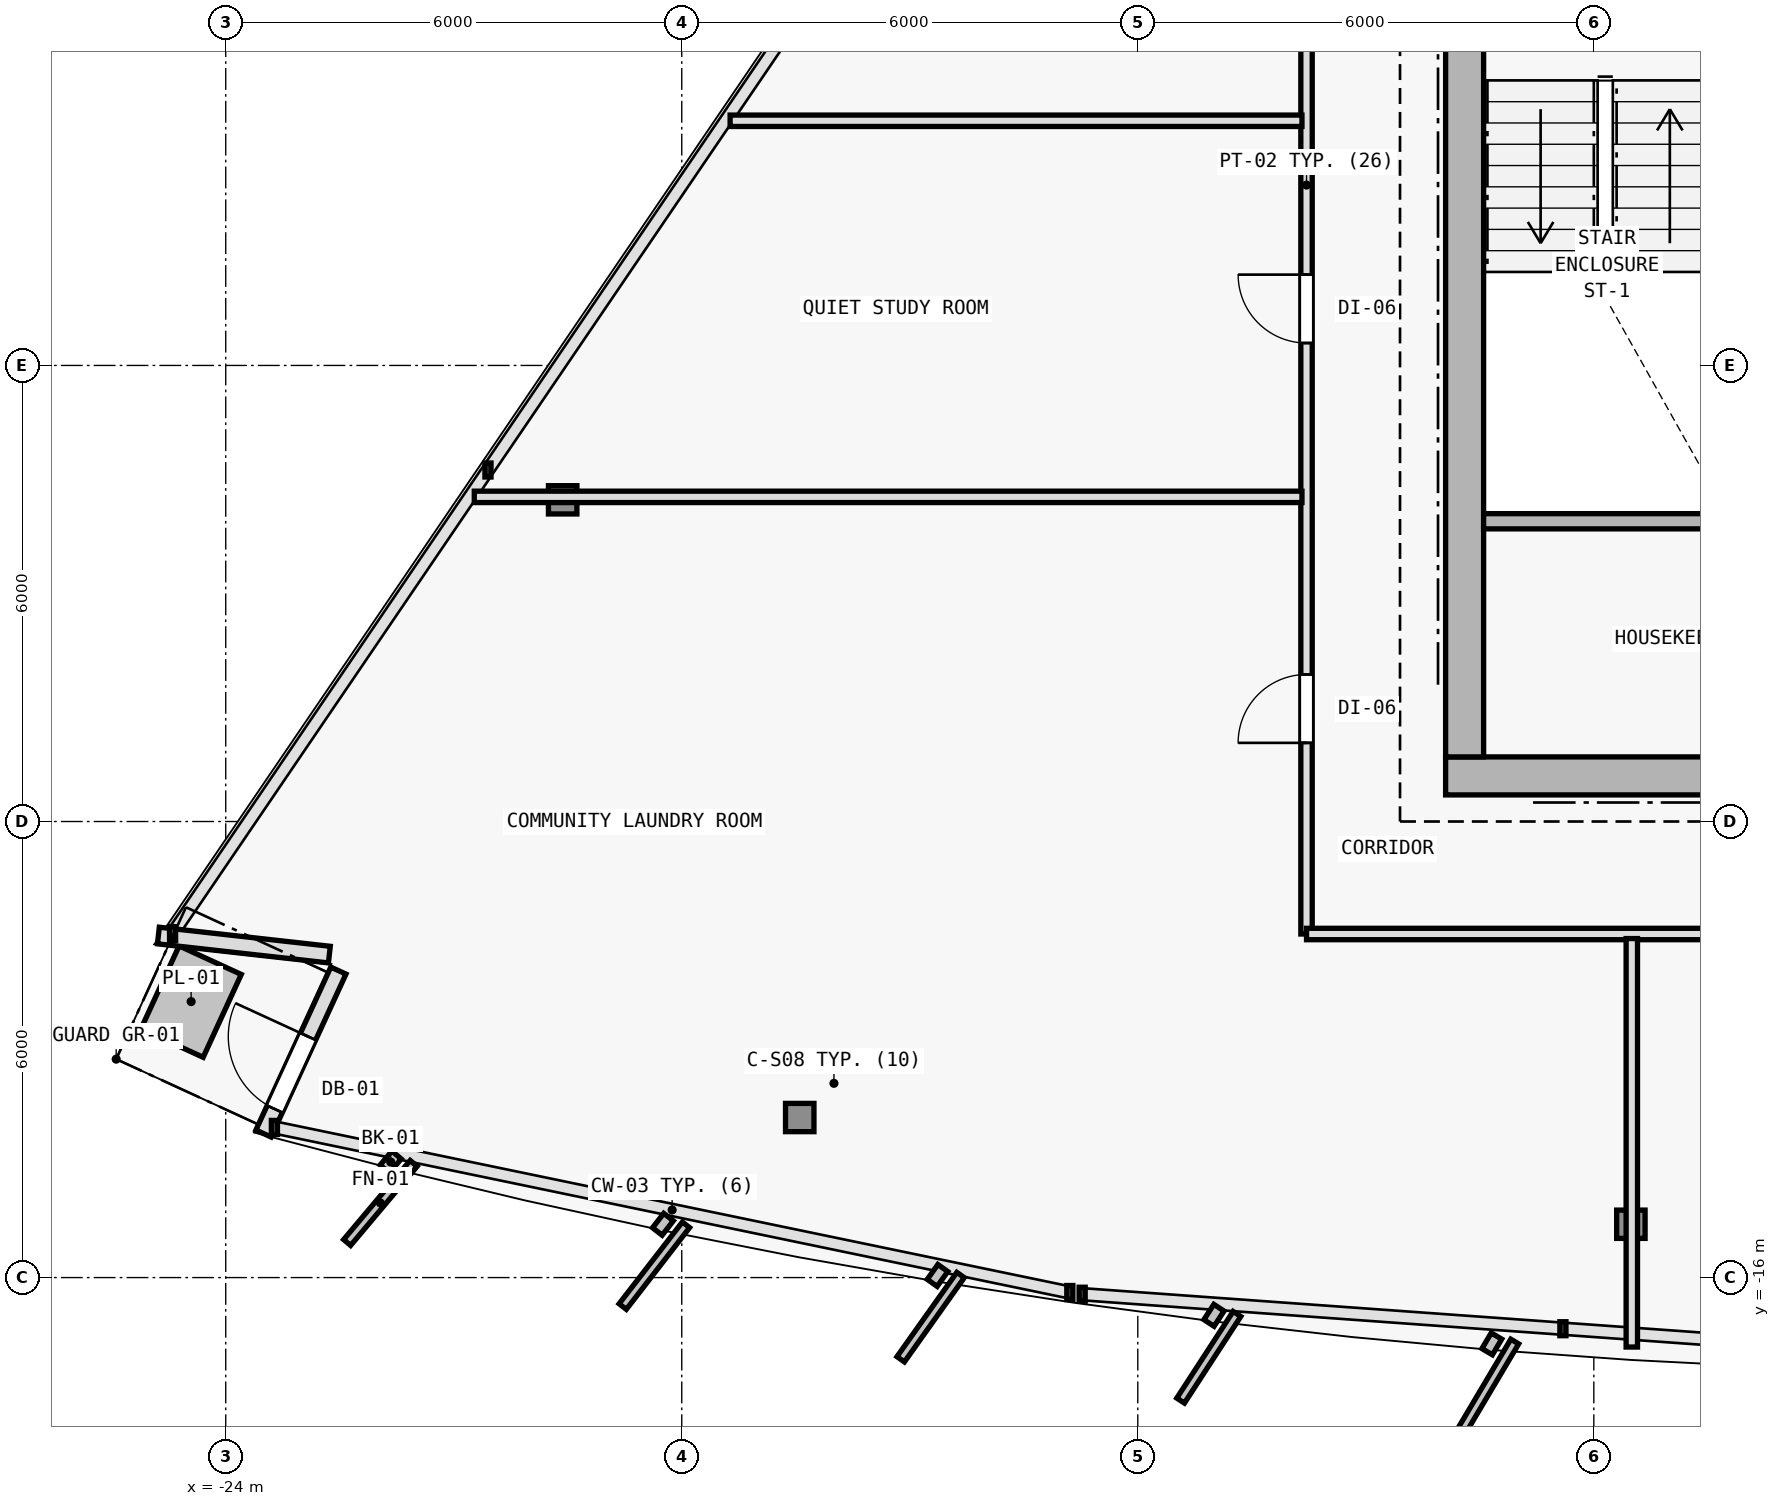
"""IFC4 building model, lengths in metres.
Left out: names, types, materials, properties, quantities, classifications, styles, units other than length and angle.
Written with IfcOpenShell. Run it as: python <this file> out.ifc"""

import sys

from ifc_helpers import new_model, si_unit, direction, frame, frame_2d, origin, origin_2d, place, context, subcontext, project, spatial, rectangle, i_section, extrude, element, fill, save


model = new_model("IFC4")
c1 = context("Model", 3, precision=1e-05, world=origin(), true_north=direction((0.0, 1.0)))
c2 = subcontext(c1, "Body", "Model", "MODEL_VIEW")
j1 = project(units=[si_unit("LENGTHUNIT", "METRE"), si_unit("PLANEANGLEUNIT", "RADIAN")], contexts=[c1])
p1 = place(None, origin())
s1 = spatial("IfcSite", under=j1, at=p1, CompositionType="ELEMENT")
p2 = place(p1, origin())
s2 = spatial("IfcBuilding", under=s1, at=p2, CompositionType="ELEMENT")
p3 = place(p2, frame((0.0, 0.0, 223.5)))
s3 = spatial("IfcBuildingStorey", under=s2, at=p3, CompositionType="ELEMENT", Elevation=223.5)
p4 = place(p3, frame((-7.7, -9.4, 0.0), z_axis=(0.0, 0.0, 1.0), x_axis=(1.0, 0.0, 0.0)))
e1 = element("IfcColumn", 1, at=p4, inside=s3, PredefinedType="COLUMN", context=c2, shape_type="SweptSolid", body=[
    extrude(i_section(OverallWidth=0.398, OverallDepth=0.387, WebThickness=0.013, FlangeThickness=0.022, FilletRadius=0.015, at=origin_2d()), origin(), (0.0, 0.0, 1.0), 3.6),
])
p5 = place(p3, frame((-16.448, -13.894, 0.006), z_axis=(0.020664285442, 0.033443514597, 0.999226960524), x_axis=(-0.850707037426, 0.525640120686, 0.0)))
e2 = element("IfcColumn", 2, at=p5, inside=s3, PredefinedType="COLUMN", context=c2, shape_type="SweptSolid", body=[
    extrude(i_section(OverallWidth=0.374, OverallDepth=0.372, WebThickness=0.012, FlangeThickness=0.02, FilletRadius=0.015, at=origin_2d()), origin(), (0.0, 0.0, 1.0), 3.592),
])
p6 = place(p3, frame((-5.513, -15.298, 0.006), z_axis=(0.006934304776, 0.03521539092, 0.999355688261), x_axis=(-0.981159154887, 0.193201223549, 0.0)))
e3 = element("IfcColumn", 3, at=p6, inside=s3, PredefinedType="COLUMN", context=c2, shape_type="SweptSolid", body=[
    extrude(i_section(OverallWidth=0.374, OverallDepth=0.372, WebThickness=0.012, FlangeThickness=0.02, FilletRadius=0.015, at=origin_2d()), origin(), (0.0, 0.0, 1.0), 3.591),
])
p7 = place(p3, frame((-19.567, -5.768, 0.006), z_axis=(0.025224163578, 0.021620711639, 0.999447990843), x_axis=(-0.650791373456, 0.759256602365, 0.0)))
e4 = element("IfcColumn", 4, at=p7, inside=s3, PredefinedType="COLUMN", context=c2, shape_type="SweptSolid", body=[
    extrude(i_section(OverallWidth=0.374, OverallDepth=0.372, WebThickness=0.012, FlangeThickness=0.02, FilletRadius=0.015, at=origin_2d()), origin(), (0.0, 0.0, 1.0), 3.591),
])
p8 = place(p3, frame((-22.637, -11.751, 0.0), z_axis=(0.0, 0.0, 1.0), x_axis=(-0.993821756753, 0.110987908368, 0.0)))
e5 = element("IfcWall", 5, at=p8, inside=s3, PredefinedType="SOLIDWALL", context=c2, shape_type="SweptSolid", body=[
    extrude(rectangle(XDim=2.263, YDim=0.22, at=frame_2d((1.132, 0.0))), origin(), (0.0, 0.0, 1.0), 3.35),
])
p9 = place(p3, frame((-23.503, -14.105, 0.0), z_axis=(0.0, 0.0, 1.0), x_axis=(0.417541737863, 0.908657744777, 0.0)))
e6 = element("IfcWall", 6, at=p9, inside=s3, PredefinedType="SOLIDWALL", context=c2, shape_type="SweptSolid", body=[
    extrude(rectangle(XDim=2.359, YDim=0.22, at=frame_2d((1.18, 0.0))), origin(), (0.0, 0.0, 1.0), 3.35),
])
p10 = place(p9, frame((0.354, 0.0, 0.0)))
e7 = element("IfcOpeningElement", 7, at=p10, cuts=e6, PredefinedType="OPENING", context=c2, shape_type="SweptSolid", body=[
    extrude(rectangle(XDim=1.05, YDim=2.15, at=frame_2d((0.525, 1.075))), frame((0.0, 0.12, 0.0), z_axis=(0.0, -1.0, 0.0), x_axis=(1.0, 0.0, 0.0)), (0.0, 0.0, 1.0), 0.24),
])
p11 = place(p3, frame((-7.95, -9.4, 0.0), z_axis=(0.0, 0.0, 1.0), x_axis=(1.0, 0.0, 0.0)))
e8 = element("IfcWall", 8, at=p11, inside=s3, PredefinedType="SHEAR", context=c2, shape_type="SweptSolid", body=[
    extrude(rectangle(XDim=15.9, YDim=0.5, at=frame_2d((7.95, 0.0))), origin(), (0.0, 0.0, 1.0), 3.35),
])
p12 = place(p11, frame((9.6, 0.0, 0.0)))
e9 = element("IfcOpeningElement", 9, at=p12, cuts=e8, PredefinedType="OPENING", context=c2, shape_type="SweptSolid", body=[
    extrude(rectangle(XDim=1.5, YDim=2.2, at=frame_2d((0.75, 1.1))), frame((0.0, 0.26, 0.0), z_axis=(0.0, -1.0, 0.0), x_axis=(1.0, 0.0, 0.0)), (0.0, 0.0, 1.0), 0.52),
])
p13 = place(p3, frame((-7.7, -9.15, 0.0), z_axis=(0.0, 0.0, 1.0), x_axis=(0.0, 1.0, 0.0)))
e10 = element("IfcWall", 10, at=p13, inside=s3, PredefinedType="SHEAR", context=c2, shape_type="SweptSolid", body=[
    extrude(rectangle(XDim=19.1, YDim=0.5, at=frame_2d((9.55, 0.0))), origin(), (0.0, 0.0, 1.0), 3.35),
])
p14 = place(p13, frame((12.7, 0.0, 0.0)))
e11 = element("IfcOpeningElement", 11, at=p14, cuts=e10, PredefinedType="OPENING", context=c2, shape_type="SweptSolid", body=[
    extrude(rectangle(XDim=1.1, YDim=2.15, at=frame_2d((0.55, 1.075))), frame((0.0, 0.26, 0.0), z_axis=(0.0, -1.0, 0.0), x_axis=(1.0, 0.0, 0.0)), (0.0, 0.0, 1.0), 0.52),
])
p15 = place(p3, frame((-7.45, -6.05, 0.0), z_axis=(0.0, 0.0, 1.0), x_axis=(1.0, 0.0, 0.0)))
e12 = element("IfcWall", 12, at=p15, inside=s3, PredefinedType="SOLIDWALL", context=c2, shape_type="SweptSolid", body=[
    extrude(rectangle(XDim=3.4, YDim=0.2, at=frame_2d((1.7, 0.0))), origin(), (0.0, 0.0, 1.0), 3.35),
])
p16 = place(p3, frame((-9.78, -11.48, 0.0), z_axis=(0.0, 0.0, 1.0), x_axis=(0.0, 1.0, 0.0)))
e13 = element("IfcWall", 13, at=p16, inside=s3, PredefinedType="PARTITIONING", context=c2, shape_type="SweptSolid", body=[
    extrude(rectangle(XDim=19.706, YDim=0.15, at=frame_2d((9.853, 0.0))), origin(), (0.0, 0.0, 1.0), 2.825),
])
p17 = place(p16, frame((7.775, 0.0, 0.0)))
e14 = element("IfcOpeningElement", 14, at=p17, cuts=e13, PredefinedType="OPENING", context=c2, shape_type="SweptSolid", body=[
    extrude(rectangle(XDim=0.9, YDim=2.1, at=frame_2d((0.45, 1.05))), frame((0.0, 0.085, 0.0), z_axis=(0.0, -1.0, 0.0), x_axis=(1.0, 0.0, 0.0)), (0.0, 0.0, 1.0), 0.17),
])
p18 = place(p16, frame((2.515, 0.0, 0.0)))
e15 = element("IfcOpeningElement", 15, at=p18, cuts=e13, PredefinedType="OPENING", context=c2, shape_type="SweptSolid", body=[
    extrude(rectangle(XDim=0.9, YDim=2.1, at=frame_2d((0.45, 1.05))), frame((0.0, 0.085, 0.0), z_axis=(0.0, -1.0, 0.0), x_axis=(1.0, 0.0, 0.0)), (0.0, 0.0, 1.0), 0.17),
])
p19 = place(p16, frame((12.635, 0.0, 0.0)))
e16 = element("IfcOpeningElement", 16, at=p19, cuts=e13, PredefinedType="OPENING", context=c2, shape_type="SweptSolid", body=[
    extrude(rectangle(XDim=0.9, YDim=2.1, at=frame_2d((0.45, 1.05))), frame((0.0, 0.085, 0.0), z_axis=(0.0, -1.0, 0.0), x_axis=(1.0, 0.0, 0.0)), (0.0, 0.0, 1.0), 0.17),
])
p20 = place(p3, frame((9.78, -11.48, 0.0), z_axis=(0.0, 0.0, 1.0), x_axis=(-1.0, 0.0, 0.0)))
e17 = element("IfcWall", 17, at=p20, inside=s3, PredefinedType="PARTITIONING", context=c2, shape_type="SweptSolid", body=[
    extrude(rectangle(XDim=19.56, YDim=0.15, at=frame_2d((9.78, 0.0))), origin(), (0.0, 0.0, 1.0), 3.005),
])
p21 = place(p20, frame((12.177, 0.0, 0.0)))
e18 = element("IfcOpeningElement", 18, at=p21, cuts=e17, PredefinedType="OPENING", context=c2, shape_type="SweptSolid", body=[
    extrude(rectangle(XDim=0.9, YDim=2.1, at=frame_2d((0.45, 1.05))), frame((0.0, 0.085, 0.0), z_axis=(0.0, -1.0, 0.0), x_axis=(1.0, 0.0, 0.0)), (0.0, 0.0, 1.0), 0.17),
])
p22 = place(p20, frame((6.677, 0.0, 0.0)))
e19 = element("IfcOpeningElement", 19, at=p22, cuts=e17, PredefinedType="OPENING", context=c2, shape_type="SweptSolid", body=[
    extrude(rectangle(XDim=0.9, YDim=2.1, at=frame_2d((0.45, 1.05))), frame((0.0, 0.085, 0.0), z_axis=(0.0, -1.0, 0.0), x_axis=(1.0, 0.0, 0.0)), (0.0, 0.0, 1.0), 0.17),
])
p23 = place(p3, frame((-5.5, -11.54, 0.0), z_axis=(0.0, 0.0, 1.0), x_axis=(0.0, -1.0, 0.0)))
e20 = element("IfcWall", 20, at=p23, inside=s3, PredefinedType="PARTITIONING", context=c2, shape_type="SweptSolid", body=[
    extrude(rectangle(XDim=5.374, YDim=0.15, at=frame_2d((2.687, 0.0))), origin(), (0.0, 0.0, 1.0), 2.775),
])
p24 = place(p3, frame((-9.84, -5.729, 0.0), z_axis=(0.0, 0.0, 1.0), x_axis=(-1.0, 0.0, 0.0)))
e21 = element("IfcWall", 21, at=p24, inside=s3, PredefinedType="PARTITIONING", context=c2, shape_type="SweptSolid", body=[
    extrude(rectangle(XDim=10.89, YDim=0.15, at=frame_2d((5.445, 0.0))), origin(), (0.0, 0.0, 1.0), 2.825),
])
p25 = place(p3, frame((-9.84, -0.781, 0.0), z_axis=(0.0, 0.0, 1.0), x_axis=(-1.0, 0.0, 0.0)))
e22 = element("IfcWall", 22, at=p25, inside=s3, PredefinedType="PARTITIONING", context=c2, shape_type="SweptSolid", body=[
    extrude(rectangle(XDim=7.524, YDim=0.15, at=frame_2d((3.762, 0.0))), origin(), (0.0, 0.0, 1.0), 2.975),
])
p26 = place(p10, origin())
e23 = element("IfcDoor", 23, at=p26, inside=s3, OperationType="SINGLE_SWING_RIGHT", PredefinedType="DOOR", context=c2, shape_type="SweptSolid", body=[
    extrude(rectangle(XDim=1.05, YDim=2.15, at=frame_2d((0.525, 1.075))), frame((0.0, 0.025, 0.0), z_axis=(0.0, -1.0, 0.0), x_axis=(1.0, 0.0, 0.0)), (0.0, 0.0, 1.0), 0.05),
])
fill(e7, e23)
p27 = place(p17, origin())
e24 = element("IfcDoor", 24, at=p27, inside=s3, OperationType="SINGLE_SWING_RIGHT", PredefinedType="DOOR", context=c2, shape_type="SweptSolid", body=[
    extrude(rectangle(XDim=0.9, YDim=2.1, at=frame_2d((0.45, 1.05))), frame((0.0, 0.025, 0.0), z_axis=(0.0, -1.0, 0.0), x_axis=(1.0, 0.0, 0.0)), (0.0, 0.0, 1.0), 0.05),
])
fill(e14, e24)
p28 = place(p18, origin())
e25 = element("IfcDoor", 25, at=p28, inside=s3, OperationType="SINGLE_SWING_LEFT", PredefinedType="DOOR", context=c2, shape_type="SweptSolid", body=[
    extrude(rectangle(XDim=0.9, YDim=2.1, at=frame_2d((0.45, 1.05))), frame((0.0, 0.025, 0.0), z_axis=(0.0, -1.0, 0.0), x_axis=(1.0, 0.0, 0.0)), (0.0, 0.0, 1.0), 0.05),
])
fill(e15, e25)
save(model, sys.argv[1])
